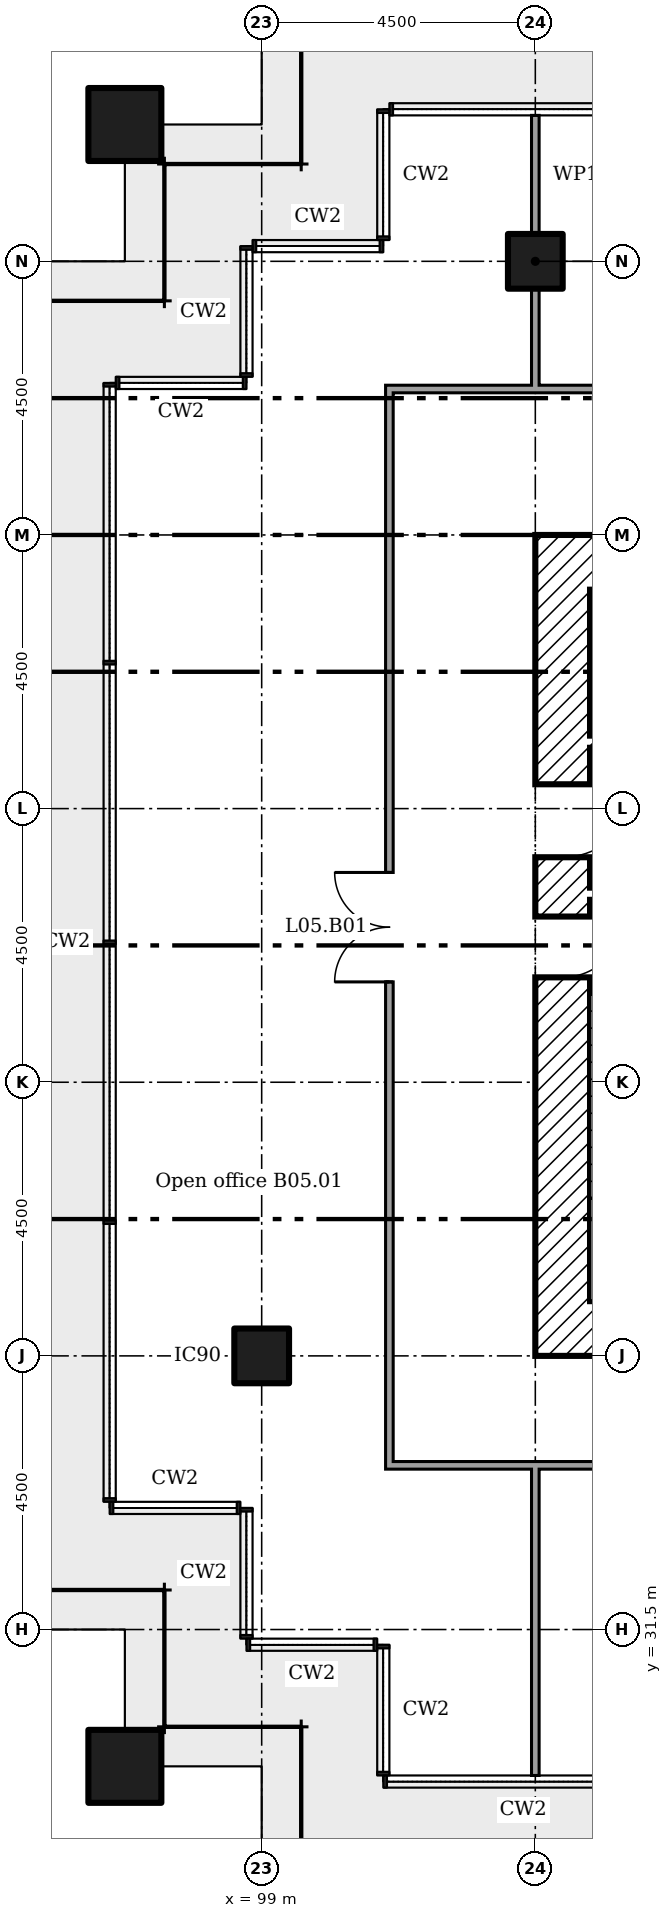
"""IFC4 building model, lengths in metres.
Left out: names, types, materials, properties, quantities, classifications, styles, units other than length and angle.
Written with IfcOpenShell. Run it as: python <this file> out.ifc"""

import sys

from ifc_helpers import new_model, si_unit, direction, frame, frame_2d, origin, origin_2d, place, context, subcontext, project, spatial, rectangle, extrude, element, fill, save


model = new_model("IFC4")
c1 = context("Model", 3, precision=1e-05, world=origin(), true_north=direction((0.0, 1.0)))
c2 = subcontext(c1, "Body", "Model", "MODEL_VIEW")
j1 = project(units=[si_unit("LENGTHUNIT", "METRE"), si_unit("PLANEANGLEUNIT", "RADIAN")], contexts=[c1])
p1 = place(None, origin())
s1 = spatial("IfcSite", under=j1, at=p1, CompositionType="ELEMENT")
p2 = place(p1, origin())
s2 = spatial("IfcBuilding", under=s1, at=p2, CompositionType="ELEMENT")
p3 = place(p2, frame((0.0, 0.0, 25.4)))
s3 = spatial("IfcBuildingStorey", under=s2, at=p3, CompositionType="ELEMENT", Elevation=25.4)
for number, where in (
    (1, (96.75, 56.25, 0.0)),
    (2, (96.75, 29.25, 0.0)),
):
    element("IfcColumn", number, at=place(p3, frame(where)), inside=s3, PredefinedType="COLUMN", context=c2, shape_type="SweptSolid", body=[
        extrude(rectangle(XDim=1.2, YDim=1.2, at=origin_2d()), origin(), (0.0, 0.0, 1.0), 4.4),
    ])
for number, where in (
    (3, (99.0, 36.0, 0.0)),
    (4, (103.5, 54.0, 0.0)),
):
    element("IfcColumn", number, at=place(p3, frame(where)), inside=s3, PredefinedType="COLUMN", context=c2, shape_type="SweptSolid", body=[
        extrude(rectangle(XDim=0.9, YDim=0.9, at=origin_2d()), origin(), (0.0, 0.0, 1.0), 4.4),
    ])
for number, where in (
    (5, (104.4, 49.05, 0.0)),
    (6, (104.4, 36.45, 0.0)),
):
    element("IfcWall", number, at=place(p3, frame(where)), inside=s3, PredefinedType="SHEAR", context=c2, shape_type="SweptSolid", body=[
        extrude(rectangle(XDim=11.7, YDim=0.9, at=frame_2d((5.85, 0.0))), origin(), (0.0, 0.0, 1.0), 4.125),
    ])
p4 = place(p3, frame((103.95, 36.0, 0.0), z_axis=(0.0, 0.0, 1.0), x_axis=(0.0, 1.0, 0.0)))
e7 = element("IfcWall", 7, at=p4, inside=s3, PredefinedType="SHEAR", context=c2, shape_type="SweptSolid", body=[
    extrude(rectangle(XDim=13.5, YDim=0.9, at=frame_2d((6.75, 0.0))), origin(), (0.0, 0.0, 1.0), 4.125),
])
p5 = place(p4, frame((8.2, 0.0, 0.0)))
e8 = element("IfcOpeningElement", 8, at=p5, cuts=e7, PredefinedType="OPENING", context=c2, shape_type="SweptSolid", body=[
    extrude(rectangle(XDim=1.2, YDim=2.1, at=frame_2d((0.6, 1.05))), frame((0.0, 0.46, 0.0), z_axis=(0.0, -1.0, 0.0), x_axis=(1.0, 0.0, 0.0)), (0.0, 0.0, 1.0), 0.92),
])
p6 = place(p4, frame((6.225, 0.0, 0.0)))
e9 = element("IfcOpeningElement", 9, at=p6, cuts=e7, PredefinedType="OPENING", context=c2, shape_type="SweptSolid", body=[
    extrude(rectangle(XDim=1.0, YDim=2.1, at=frame_2d((0.5, 1.05))), frame((0.0, 0.46, 0.0), z_axis=(0.0, -1.0, 0.0), x_axis=(1.0, 0.0, 0.0)), (0.0, 0.0, 1.0), 0.92),
])
p7 = place(p3, frame((104.4, 46.1, 0.0)))
e10 = element("IfcWall", 10, at=p7, inside=s3, PredefinedType="SHEAR", context=c2, shape_type="SweptSolid", body=[
    extrude(rectangle(XDim=2.933, YDim=0.2, at=frame_2d((1.467, 0.0))), origin(), (0.0, 0.0, 1.0), 4.125),
])
p8 = place(p7, frame((1.117, 0.0, 0.0)))
e11 = element("IfcOpeningElement", 11, at=p8, cuts=e10, PredefinedType="OPENING", context=c2, shape_type="SweptSolid", body=[
    extrude(rectangle(XDim=0.9, YDim=2.1, at=frame_2d((0.45, 1.05))), frame((0.0, 0.11, 0.0), z_axis=(0.0, -1.0, 0.0), x_axis=(1.0, 0.0, 0.0)), (0.0, 0.0, 1.0), 0.22),
])
p9 = place(p3, frame((104.4, 43.6, 0.0)))
e12 = element("IfcWall", 12, at=p9, inside=s3, PredefinedType="SHEAR", context=c2, shape_type="SweptSolid", body=[
    extrude(rectangle(XDim=2.6, YDim=0.2, at=frame_2d((1.3, 0.0))), origin(), (0.0, 0.0, 1.0), 4.125),
])
p10 = place(p9, frame((0.85, 0.0, 0.0)))
e13 = element("IfcOpeningElement", 13, at=p10, cuts=e12, PredefinedType="OPENING", context=c2, shape_type="SweptSolid", body=[
    extrude(rectangle(XDim=1.0, YDim=2.1, at=frame_2d((0.5, 1.05))), frame((0.0, 0.11, 0.0), z_axis=(0.0, -1.0, 0.0), x_axis=(1.0, 0.0, 0.0)), (0.0, 0.0, 1.0), 0.22),
])
p11 = place(p3, frame((101.038, 34.2, 0.0)))
e14 = element("IfcWall", 14, at=p11, inside=s3, PredefinedType="PARTITIONING", context=c2, shape_type="SweptSolid", body=[
    extrude(rectangle(XDim=19.025, YDim=0.125, at=frame_2d((9.512, 0.0))), origin(), (0.0, 0.0, 1.0), 4.225),
])
p12 = place(p11, frame((5.219, 0.0, 0.0)))
e15 = element("IfcOpeningElement", 15, at=p12, cuts=e14, PredefinedType="OPENING", context=c2, shape_type="SweptSolid", body=[
    extrude(rectangle(XDim=1.0, YDim=2.1, at=frame_2d((0.5, 1.05))), frame((0.0, 0.073, 0.0), z_axis=(0.0, -1.0, 0.0), x_axis=(1.0, 0.0, 0.0)), (0.0, 0.0, 1.0), 0.145),
])
p13 = place(p11, frame((13.667, 0.0, 0.0)))
e16 = element("IfcOpeningElement", 16, at=p13, cuts=e14, PredefinedType="OPENING", context=c2, shape_type="SweptSolid", body=[
    extrude(rectangle(XDim=1.0, YDim=2.1, at=frame_2d((0.5, 1.05))), frame((0.0, 0.073, 0.0), z_axis=(0.0, -1.0, 0.0), x_axis=(1.0, 0.0, 0.0)), (0.0, 0.0, 1.0), 0.145),
])
p14 = place(p3, frame((101.038, 51.9, 0.0)))
e17 = element("IfcWall", 17, at=p14, inside=s3, PredefinedType="PARTITIONING", context=c2, shape_type="SweptSolid", body=[
    extrude(rectangle(XDim=19.025, YDim=0.125, at=frame_2d((9.512, 0.0))), origin(), (0.0, 0.0, 1.0), 4.225),
])
p15 = place(p14, frame((9.719, 0.0, 0.0)))
e18 = element("IfcOpeningElement", 18, at=p15, cuts=e17, PredefinedType="OPENING", context=c2, shape_type="SweptSolid", body=[
    extrude(rectangle(XDim=1.0, YDim=2.1, at=frame_2d((0.5, 1.05))), frame((0.0, 0.073, 0.0), z_axis=(0.0, -1.0, 0.0), x_axis=(1.0, 0.0, 0.0)), (0.0, 0.0, 1.0), 0.145),
])
p16 = place(p14, frame((4.667, 0.0, 0.0)))
e19 = element("IfcOpeningElement", 19, at=p16, cuts=e17, PredefinedType="OPENING", context=c2, shape_type="SweptSolid", body=[
    extrude(rectangle(XDim=1.0, YDim=2.1, at=frame_2d((0.5, 1.05))), frame((0.0, 0.073, 0.0), z_axis=(0.0, -1.0, 0.0), x_axis=(1.0, 0.0, 0.0)), (0.0, 0.0, 1.0), 0.145),
])
p17 = place(p3, frame((101.1, 34.262, 0.0), z_axis=(0.0, 0.0, 1.0), x_axis=(0.0, 1.0, 0.0)))
e20 = element("IfcWall", 20, at=p17, inside=s3, PredefinedType="PARTITIONING", context=c2, shape_type="SweptSolid", body=[
    extrude(rectangle(XDim=17.575, YDim=0.125, at=frame_2d((8.788, 0.0))), origin(), (0.0, 0.0, 1.0), 4.225),
])
p18 = place(p17, frame((7.887, 0.0, 0.0)))
e21 = element("IfcOpeningElement", 21, at=p18, cuts=e20, PredefinedType="OPENING", context=c2, shape_type="SweptSolid", body=[
    extrude(rectangle(XDim=1.8, YDim=2.1, at=frame_2d((0.9, 1.05))), frame((0.0, 0.073, 0.0), z_axis=(0.0, -1.0, 0.0), x_axis=(1.0, 0.0, 0.0)), (0.0, 0.0, 1.0), 0.145),
])
p19 = place(p3, frame((103.5, 29.1, 0.0), z_axis=(0.0, 0.0, 1.0), x_axis=(0.0, 1.0, 0.0)))
e22 = element("IfcWall", 22, at=p19, inside=s3, PredefinedType="PARTITIONING", context=c2, shape_type="SweptSolid", body=[
    extrude(rectangle(XDim=5.1, YDim=0.125, at=frame_2d((2.55, 0.0))), origin(), (0.0, 0.0, 1.0), 3.613),
])
p20 = place(p3, frame((103.5, 51.9, 0.0), z_axis=(0.0, 0.0, 1.0), x_axis=(0.0, 1.0, 0.0)))
e23 = element("IfcWall", 23, at=p20, inside=s3, PredefinedType="PARTITIONING", context=c2, shape_type="SweptSolid", body=[
    extrude(rectangle(XDim=1.65, YDim=0.125, at=frame_2d((0.825, 0.0))), origin(), (0.0, 0.0, 1.0), 3.602),
])
p21 = place(p3, frame((103.5, 54.45, 0.0), z_axis=(0.0, 0.0, 1.0), x_axis=(0.0, 1.0, 0.0)))
e24 = element("IfcWall", 24, at=p21, inside=s3, PredefinedType="PARTITIONING", context=c2, shape_type="SweptSolid", body=[
    extrude(rectangle(XDim=1.95, YDim=0.125, at=frame_2d((0.975, 0.0))), origin(), (0.0, 0.0, 1.0), 3.602),
])
p22 = place(p5, frame((1.2, 0.0, 0.0), x_axis=(-1.0, 0.0, 0.0)))
e25 = element("IfcDoor", 25, at=p22, inside=s3, OperationType="SINGLE_SWING_RIGHT", PredefinedType="DOOR", context=c2, shape_type="SweptSolid", body=[
    extrude(rectangle(XDim=1.2, YDim=2.1, at=frame_2d((0.6, 1.05))), frame((0.0, 0.025, 0.0), z_axis=(0.0, -1.0, 0.0), x_axis=(1.0, 0.0, 0.0)), (0.0, 0.0, 1.0), 0.05),
])
fill(e8, e25)
p23 = place(p6, frame((1.0, 0.0, 0.0), x_axis=(-1.0, 0.0, 0.0)))
e26 = element("IfcDoor", 26, at=p23, inside=s3, OperationType="SINGLE_SWING_RIGHT", PredefinedType="DOOR", context=c2, shape_type="SweptSolid", body=[
    extrude(rectangle(XDim=1.0, YDim=2.1, at=frame_2d((0.5, 1.05))), frame((0.0, 0.025, 0.0), z_axis=(0.0, -1.0, 0.0), x_axis=(1.0, 0.0, 0.0)), (0.0, 0.0, 1.0), 0.05),
])
fill(e9, e26)
p24 = place(p18, origin())
e27 = element("IfcDoor", 27, at=p24, inside=s3, OperationType="DOUBLE_DOOR_SINGLE_SWING", PredefinedType="DOOR", context=c2, shape_type="SweptSolid", body=[
    extrude(rectangle(XDim=1.8, YDim=2.1, at=frame_2d((0.9, 1.05))), frame((0.0, 0.025, 0.0), z_axis=(0.0, -1.0, 0.0), x_axis=(1.0, 0.0, 0.0)), (0.0, 0.0, 1.0), 0.05),
])
fill(e21, e27)
save(model, sys.argv[1])
